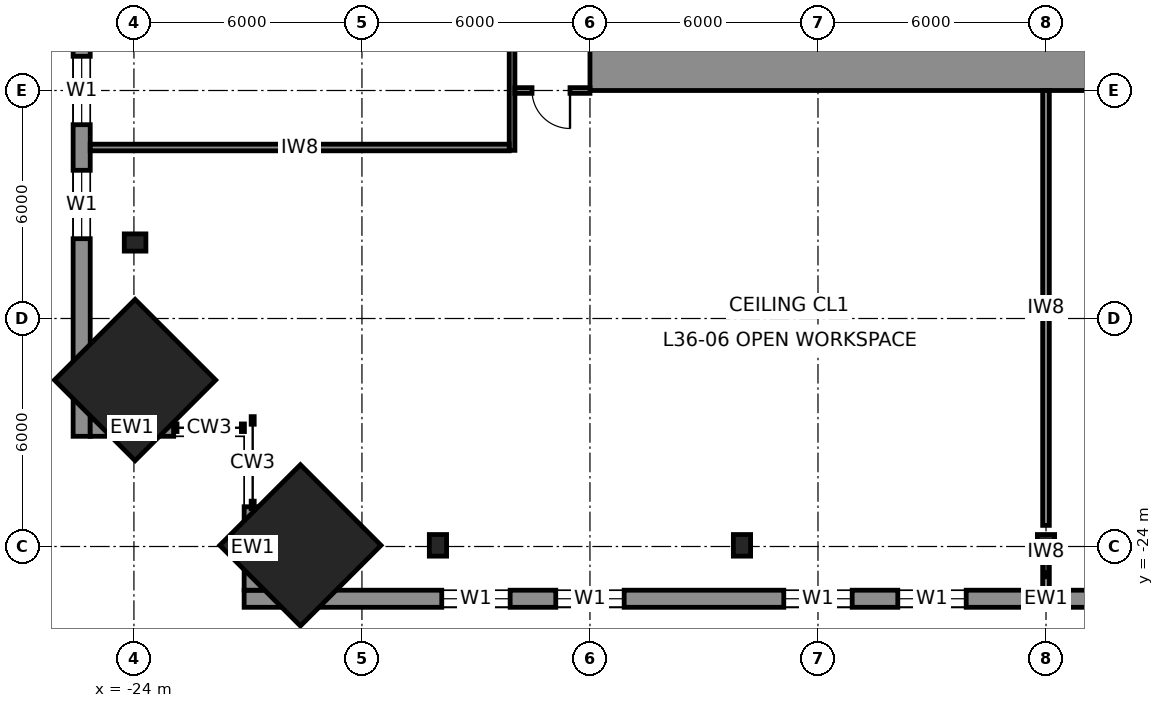
"""IFC4 building model, lengths in metres.
Left out: names, types, materials, properties, quantities, classifications, styles, units other than length and angle.
Written with IfcOpenShell. Run it as: python <this file> out.ifc"""

import sys

from ifc_helpers import new_model, si_unit, direction, frame, frame_2d, origin, origin_2d, place, context, subcontext, project, spatial, rectangle, i_section, extrude, element, fill, save


model = new_model("IFC4")
c1 = context("Model", 3, precision=1e-05, world=origin(), true_north=direction((0.0, 1.0)))
c2 = subcontext(c1, "Body", "Model", "MODEL_VIEW")
j1 = project(units=[si_unit("LENGTHUNIT", "METRE"), si_unit("PLANEANGLEUNIT", "RADIAN")], contexts=[c1])
p1 = place(None, origin())
s1 = spatial("IfcSite", under=j1, at=p1, CompositionType="ELEMENT")
p2 = place(p1, origin())
s2 = spatial("IfcBuilding", under=s1, at=p2, CompositionType="ELEMENT")
p3 = place(p2, frame((0.0, 0.0, 171.8)))
s3 = spatial("IfcBuildingStorey", under=s2, at=p3, CompositionType="ELEMENT", Elevation=171.8)
for number, where, z_axis, x_axis in (
    (1, (-19.619, -23.969, 0.0), (0.04, 0.04, 0.998), (-0.707, 0.708, 0.0)),
    (2, (-23.969, -19.619, 0.0), (0.04, 0.04, 0.998), (-0.708, 0.707, 0.0)),
):
    element("IfcColumn", number, at=place(p3, frame(where, z_axis=z_axis, x_axis=x_axis)), inside=s3, PredefinedType="COLUMN", context=c2, shape_type="SweptSolid", body=[
        extrude(rectangle(XDim=3.0, YDim=3.0, at=origin_2d()), origin(), (0.0, 0.0, 1.0), 4.007),
    ])
for number, where, z_axis, x_axis in (
    (3, (0.0, -23.969, 0.0), (0.0, 0.04, 0.999), (-1.0, 0.0, 0.0)),
    (4, (-8.0, -23.969, 0.0), (0.0, 0.04, 0.999), (-1.0, 0.0, 0.0)),
    (5, (-16.0, -23.969, 0.0), (0.0, 0.04, 0.999), (-1.0, 0.0, 0.0)),
    (6, (-23.969, -16.0, 0.0), (0.04, 0.0, 0.999), (0.0, 1.0, 0.0)),
):
    element("IfcColumn", number, at=place(p3, frame(where, z_axis=z_axis, x_axis=x_axis)), inside=s3, PredefinedType="COLUMN", context=c2, shape_type="SweptSolid", body=[
        extrude(i_section(OverallWidth=0.454, OverallDepth=0.569, WebThickness=0.078, FlangeThickness=0.125, at=origin_2d()), origin(), (0.0, 0.0, 1.0), 4.003),
    ])
p4 = place(p3, frame((12.0, -11.25, 0.0), z_axis=(0.0, 0.0, 1.0), x_axis=(-1.0, 0.0, 0.0)))
e7 = element("IfcWall", 7, at=p4, inside=s3, PredefinedType="SHEAR", context=c2, shape_type="SweptSolid", body=[
    extrude(rectangle(XDim=24.0, YDim=1.5, at=frame_2d((12.0, 0.0))), origin(), (0.0, 0.0, 1.0), 4.0),
])
p5 = place(p3, frame((-21.1, -25.375, 0.0), z_axis=(0.0, 0.0, 1.0), x_axis=(1.0, 0.0, 0.0)))
e8 = element("IfcWall", 8, at=p5, inside=s3, PredefinedType="SOLIDWALL", context=c2, shape_type="SweptSolid", body=[
    extrude(rectangle(XDim=42.2, YDim=0.45, at=frame_2d((21.1, 0.0))), origin(), (0.0, 0.0, 1.0), 3.83),
])
p6 = place(p5, frame((5.2, 0.0, 0.7)))
e9 = element("IfcOpeningElement", 9, at=p6, cuts=e8, PredefinedType="OPENING", context=c2, shape_type="SweptSolid", body=[
    extrude(rectangle(XDim=1.8, YDim=2.6, at=frame_2d((0.9, 1.3))), frame((0.0, 0.235, 0.0), z_axis=(0.0, -1.0, 0.0), x_axis=(1.0, 0.0, 0.0)), (0.0, 0.0, 1.0), 0.47),
])
p7 = place(p5, frame((8.2, 0.0, 0.7)))
e10 = element("IfcOpeningElement", 10, at=p7, cuts=e8, PredefinedType="OPENING", context=c2, shape_type="SweptSolid", body=[
    extrude(rectangle(XDim=1.8, YDim=2.6, at=frame_2d((0.9, 1.3))), frame((0.0, 0.235, 0.0), z_axis=(0.0, -1.0, 0.0), x_axis=(1.0, 0.0, 0.0)), (0.0, 0.0, 1.0), 0.47),
])
p8 = place(p5, frame((14.2, 0.0, 0.7)))
e11 = element("IfcOpeningElement", 11, at=p8, cuts=e8, PredefinedType="OPENING", context=c2, shape_type="SweptSolid", body=[
    extrude(rectangle(XDim=1.8, YDim=2.6, at=frame_2d((0.9, 1.3))), frame((0.0, 0.235, 0.0), z_axis=(0.0, -1.0, 0.0), x_axis=(1.0, 0.0, 0.0)), (0.0, 0.0, 1.0), 0.47),
])
p9 = place(p5, frame((17.2, 0.0, 0.7)))
e12 = element("IfcOpeningElement", 12, at=p9, cuts=e8, PredefinedType="OPENING", context=c2, shape_type="SweptSolid", body=[
    extrude(rectangle(XDim=1.8, YDim=2.6, at=frame_2d((0.9, 1.3))), frame((0.0, 0.235, 0.0), z_axis=(0.0, -1.0, 0.0), x_axis=(1.0, 0.0, 0.0)), (0.0, 0.0, 1.0), 0.47),
])
p10 = place(p5, frame((23.2, 0.0, 0.7)))
e13 = element("IfcOpeningElement", 13, at=p10, cuts=e8, PredefinedType="OPENING", context=c2, shape_type="SweptSolid", body=[
    extrude(rectangle(XDim=1.8, YDim=2.6, at=frame_2d((0.9, 1.3))), frame((0.0, 0.235, 0.0), z_axis=(0.0, -1.0, 0.0), x_axis=(1.0, 0.0, 0.0)), (0.0, 0.0, 1.0), 0.47),
])
p11 = place(p5, frame((26.2, 0.0, 0.7)))
e14 = element("IfcOpeningElement", 14, at=p11, cuts=e8, PredefinedType="OPENING", context=c2, shape_type="SweptSolid", body=[
    extrude(rectangle(XDim=1.8, YDim=2.6, at=frame_2d((0.9, 1.3))), frame((0.0, 0.235, 0.0), z_axis=(0.0, -1.0, 0.0), x_axis=(1.0, 0.0, 0.0)), (0.0, 0.0, 1.0), 0.47),
])
p12 = place(p5, frame((32.2, 0.0, 0.7)))
e15 = element("IfcOpeningElement", 15, at=p12, cuts=e8, PredefinedType="OPENING", context=c2, shape_type="SweptSolid", body=[
    extrude(rectangle(XDim=1.8, YDim=2.6, at=frame_2d((0.9, 1.3))), frame((0.0, 0.235, 0.0), z_axis=(0.0, -1.0, 0.0), x_axis=(1.0, 0.0, 0.0)), (0.0, 0.0, 1.0), 0.47),
])
p13 = place(p5, frame((35.2, 0.0, 0.7)))
e16 = element("IfcOpeningElement", 16, at=p13, cuts=e8, PredefinedType="OPENING", context=c2, shape_type="SweptSolid", body=[
    extrude(rectangle(XDim=1.8, YDim=2.6, at=frame_2d((0.9, 1.3))), frame((0.0, 0.235, 0.0), z_axis=(0.0, -1.0, 0.0), x_axis=(1.0, 0.0, 0.0)), (0.0, 0.0, 1.0), 0.47),
])
p14 = place(p3, frame((-25.375, 21.1, 0.0), z_axis=(0.0, 0.0, 1.0), x_axis=(0.0, -1.0, 0.0)))
e17 = element("IfcWall", 17, at=p14, inside=s3, PredefinedType="SOLIDWALL", context=c2, shape_type="SweptSolid", body=[
    extrude(rectangle(XDim=42.2, YDim=0.45, at=frame_2d((21.1, 0.0))), origin(), (0.0, 0.0, 1.0), 3.83),
])
p15 = place(p14, frame((5.2, 0.0, 0.7)))
e18 = element("IfcOpeningElement", 18, at=p15, cuts=e17, PredefinedType="OPENING", context=c2, shape_type="SweptSolid", body=[
    extrude(rectangle(XDim=1.8, YDim=2.6, at=frame_2d((0.9, 1.3))), frame((0.0, 0.235, 0.0), z_axis=(0.0, -1.0, 0.0), x_axis=(1.0, 0.0, 0.0)), (0.0, 0.0, 1.0), 0.47),
])
p16 = place(p14, frame((8.2, 0.0, 0.7)))
e19 = element("IfcOpeningElement", 19, at=p16, cuts=e17, PredefinedType="OPENING", context=c2, shape_type="SweptSolid", body=[
    extrude(rectangle(XDim=1.8, YDim=2.6, at=frame_2d((0.9, 1.3))), frame((0.0, 0.235, 0.0), z_axis=(0.0, -1.0, 0.0), x_axis=(1.0, 0.0, 0.0)), (0.0, 0.0, 1.0), 0.47),
])
p17 = place(p14, frame((14.2, 0.0, 0.7)))
e20 = element("IfcOpeningElement", 20, at=p17, cuts=e17, PredefinedType="OPENING", context=c2, shape_type="SweptSolid", body=[
    extrude(rectangle(XDim=1.8, YDim=2.6, at=frame_2d((0.9, 1.3))), frame((0.0, 0.235, 0.0), z_axis=(0.0, -1.0, 0.0), x_axis=(1.0, 0.0, 0.0)), (0.0, 0.0, 1.0), 0.47),
])
p18 = place(p14, frame((17.2, 0.0, 0.7)))
e21 = element("IfcOpeningElement", 21, at=p18, cuts=e17, PredefinedType="OPENING", context=c2, shape_type="SweptSolid", body=[
    extrude(rectangle(XDim=1.8, YDim=2.6, at=frame_2d((0.9, 1.3))), frame((0.0, 0.235, 0.0), z_axis=(0.0, -1.0, 0.0), x_axis=(1.0, 0.0, 0.0)), (0.0, 0.0, 1.0), 0.47),
])
p19 = place(p14, frame((23.2, 0.0, 0.7)))
e22 = element("IfcOpeningElement", 22, at=p19, cuts=e17, PredefinedType="OPENING", context=c2, shape_type="SweptSolid", body=[
    extrude(rectangle(XDim=1.8, YDim=2.6, at=frame_2d((0.9, 1.3))), frame((0.0, 0.235, 0.0), z_axis=(0.0, -1.0, 0.0), x_axis=(1.0, 0.0, 0.0)), (0.0, 0.0, 1.0), 0.47),
])
p20 = place(p14, frame((26.2, 0.0, 0.7)))
e23 = element("IfcOpeningElement", 23, at=p20, cuts=e17, PredefinedType="OPENING", context=c2, shape_type="SweptSolid", body=[
    extrude(rectangle(XDim=1.8, YDim=2.6, at=frame_2d((0.9, 1.3))), frame((0.0, 0.235, 0.0), z_axis=(0.0, -1.0, 0.0), x_axis=(1.0, 0.0, 0.0)), (0.0, 0.0, 1.0), 0.47),
])
p21 = place(p14, frame((32.2, 0.0, 0.7)))
e24 = element("IfcOpeningElement", 24, at=p21, cuts=e17, PredefinedType="OPENING", context=c2, shape_type="SweptSolid", body=[
    extrude(rectangle(XDim=1.8, YDim=2.6, at=frame_2d((0.9, 1.3))), frame((0.0, 0.235, 0.0), z_axis=(0.0, -1.0, 0.0), x_axis=(1.0, 0.0, 0.0)), (0.0, 0.0, 1.0), 0.47),
])
p22 = place(p14, frame((35.2, 0.0, 0.7)))
e25 = element("IfcOpeningElement", 25, at=p22, cuts=e17, PredefinedType="OPENING", context=c2, shape_type="SweptSolid", body=[
    extrude(rectangle(XDim=1.8, YDim=2.6, at=frame_2d((0.9, 1.3))), frame((0.0, 0.235, 0.0), z_axis=(0.0, -1.0, 0.0), x_axis=(1.0, 0.0, 0.0)), (0.0, 0.0, 1.0), 0.47),
])
for number, where, z_axis, x_axis in (
    (26, (-20.875, -22.954, 0.0), (0.0, 0.0, 1.0), (0.0, -1.0, 0.0)),
    (27, (-22.954, -20.875, 0.0), (0.0, 0.0, 1.0), (-1.0, 0.0, 0.0)),
):
    element("IfcWall", number, at=place(p3, frame(where, z_axis=z_axis, x_axis=x_axis)), inside=s3, PredefinedType="SOLIDWALL", context=c2, shape_type="SweptSolid", body=[
        extrude(rectangle(XDim=2.196, YDim=0.45, at=frame_2d((1.098, 0.0))), origin(), (0.0, 0.0, 1.0), 3.83),
    ])
p23 = place(p3, frame((-14.05, 13.975, 0.0), z_axis=(0.0, 0.0, 1.0), x_axis=(0.0, -1.0, 0.0)))
e28 = element("IfcWall", 28, at=p23, inside=s3, PredefinedType="PARTITIONING", context=c2, shape_type="SweptSolid", body=[
    extrude(rectangle(XDim=27.55, YDim=0.15, at=frame_2d((13.775, 0.0))), origin(), (0.0, 0.0, 1.0), 3.83),
])
p24 = place(p23, frame((22.025, 0.0, 0.0)))
e29 = element("IfcOpeningElement", 29, at=p24, cuts=e28, PredefinedType="OPENING", context=c2, shape_type="SweptSolid", body=[
    extrude(rectangle(XDim=1.6, YDim=2.3, at=frame_2d((0.8, 1.15))), frame((0.0, 0.085, 0.0), z_axis=(0.0, -1.0, 0.0), x_axis=(1.0, 0.0, 0.0)), (0.0, 0.0, 1.0), 0.17),
])
p25 = place(p23, frame((2.825, 0.0, 0.0)))
e30 = element("IfcOpeningElement", 30, at=p25, cuts=e28, PredefinedType="OPENING", context=c2, shape_type="SweptSolid", body=[
    extrude(rectangle(XDim=1.0, YDim=2.3, at=frame_2d((0.5, 1.15))), frame((0.0, 0.085, 0.0), z_axis=(0.0, -1.0, 0.0), x_axis=(1.0, 0.0, 0.0)), (0.0, 0.0, 1.0), 0.17),
])
p26 = place(p23, frame((17.975, 0.0, 0.0)))
e31 = element("IfcOpeningElement", 31, at=p26, cuts=e28, PredefinedType="OPENING", context=c2, shape_type="SweptSolid", body=[
    extrude(rectangle(XDim=1.0, YDim=2.3, at=frame_2d((0.5, 1.15))), frame((0.0, 0.085, 0.0), z_axis=(0.0, -1.0, 0.0), x_axis=(1.0, 0.0, 0.0)), (0.0, 0.0, 1.0), 0.17),
])
p27 = place(p23, frame((9.975, 0.0, 0.0)))
e32 = element("IfcOpeningElement", 32, at=p27, cuts=e28, PredefinedType="OPENING", context=c2, shape_type="SweptSolid", body=[
    extrude(rectangle(XDim=1.0, YDim=2.3, at=frame_2d((0.5, 1.15))), frame((0.0, 0.085, 0.0), z_axis=(0.0, -1.0, 0.0), x_axis=(1.0, 0.0, 0.0)), (0.0, 0.0, 1.0), 0.17),
])
p28 = place(p3, frame((-12.0, -12.0, 0.0), z_axis=(0.0, 0.0, 1.0), x_axis=(-1.0, 0.0, 0.0)))
e33 = element("IfcWall", 33, at=p28, inside=s3, PredefinedType="PARTITIONING", context=c2, shape_type="SweptSolid", body=[
    extrude(rectangle(XDim=1.975, YDim=0.15, at=frame_2d((0.988, 0.0))), origin(), (0.0, 0.0, 1.0), 3.83),
])
p29 = place(p28, frame((0.525, 0.0, 0.0)))
e34 = element("IfcOpeningElement", 34, at=p29, cuts=e33, PredefinedType="OPENING", context=c2, shape_type="SweptSolid", body=[
    extrude(rectangle(XDim=1.0, YDim=2.3, at=frame_2d((0.5, 1.15))), frame((0.0, 0.085, 0.0), z_axis=(0.0, -1.0, 0.0), x_axis=(1.0, 0.0, 0.0)), (0.0, 0.0, 1.0), 0.17),
])
p30 = place(p3, frame((-14.125, -13.5, 0.0), z_axis=(0.0, 0.0, 1.0), x_axis=(-1.0, 0.0, 0.0)))
e35 = element("IfcWall", 35, at=p30, inside=s3, PredefinedType="PARTITIONING", context=c2, shape_type="SweptSolid", body=[
    extrude(rectangle(XDim=11.025, YDim=0.175, at=frame_2d((5.512, 0.0))), origin(), (0.0, 0.0, 1.0), 3.83),
])
p31 = place(p3, frame((0.0, -12.0, 0.0), z_axis=(0.0, 0.0, 1.0), x_axis=(0.0, -1.0, 0.0)))
e36 = element("IfcWall", 36, at=p31, inside=s3, PredefinedType="PARTITIONING", context=c2, shape_type="SweptSolid", body=[
    extrude(rectangle(XDim=11.444, YDim=0.175, at=frame_2d((5.722, 0.0))), origin(), (0.0, 0.0, 1.0), 2.84),
])
p32 = place(p3, frame((0.0, -24.333, 0.0), z_axis=(0.0, 0.0, 1.0), x_axis=(0.0, -1.0, 0.0)))
e37 = element("IfcWall", 37, at=p32, inside=s3, PredefinedType="PARTITIONING", context=c2, shape_type="SweptSolid", body=[
    extrude(rectangle(XDim=0.817, YDim=0.175, at=frame_2d((0.408, 0.0))), origin(), (0.0, 0.0, 1.0), 3.83),
])
p33 = place(p6, origin())
e38 = element("IfcWindow", 38, at=p33, inside=s3, PartitioningType="SINGLE_PANEL", PredefinedType="WINDOW", context=c2, shape_type="SweptSolid", body=[
    extrude(rectangle(XDim=1.8, YDim=2.6, at=frame_2d((0.9, 1.3))), frame((0.0, 0.03, 0.0), z_axis=(0.0, -1.0, 0.0), x_axis=(1.0, 0.0, 0.0)), (0.0, 0.0, 1.0), 0.06),
])
fill(e9, e38)
p34 = place(p7, origin())
e39 = element("IfcWindow", 39, at=p34, inside=s3, PartitioningType="SINGLE_PANEL", PredefinedType="WINDOW", context=c2, shape_type="SweptSolid", body=[
    extrude(rectangle(XDim=1.8, YDim=2.6, at=frame_2d((0.9, 1.3))), frame((0.0, 0.03, 0.0), z_axis=(0.0, -1.0, 0.0), x_axis=(1.0, 0.0, 0.0)), (0.0, 0.0, 1.0), 0.06),
])
fill(e10, e39)
p35 = place(p8, origin())
e40 = element("IfcWindow", 40, at=p35, inside=s3, PartitioningType="SINGLE_PANEL", PredefinedType="WINDOW", context=c2, shape_type="SweptSolid", body=[
    extrude(rectangle(XDim=1.8, YDim=2.6, at=frame_2d((0.9, 1.3))), frame((0.0, 0.03, 0.0), z_axis=(0.0, -1.0, 0.0), x_axis=(1.0, 0.0, 0.0)), (0.0, 0.0, 1.0), 0.06),
])
fill(e11, e40)
p36 = place(p9, origin())
e41 = element("IfcWindow", 41, at=p36, inside=s3, PartitioningType="SINGLE_PANEL", PredefinedType="WINDOW", context=c2, shape_type="SweptSolid", body=[
    extrude(rectangle(XDim=1.8, YDim=2.6, at=frame_2d((0.9, 1.3))), frame((0.0, 0.03, 0.0), z_axis=(0.0, -1.0, 0.0), x_axis=(1.0, 0.0, 0.0)), (0.0, 0.0, 1.0), 0.06),
])
fill(e12, e41)
p37 = place(p21, origin())
e42 = element("IfcWindow", 42, at=p37, inside=s3, PartitioningType="SINGLE_PANEL", PredefinedType="WINDOW", context=c2, shape_type="SweptSolid", body=[
    extrude(rectangle(XDim=1.8, YDim=2.6, at=frame_2d((0.9, 1.3))), frame((0.0, 0.03, 0.0), z_axis=(0.0, -1.0, 0.0), x_axis=(1.0, 0.0, 0.0)), (0.0, 0.0, 1.0), 0.06),
])
fill(e24, e42)
p38 = place(p22, origin())
e43 = element("IfcWindow", 43, at=p38, inside=s3, PartitioningType="SINGLE_PANEL", PredefinedType="WINDOW", context=c2, shape_type="SweptSolid", body=[
    extrude(rectangle(XDim=1.8, YDim=2.6, at=frame_2d((0.9, 1.3))), frame((0.0, 0.03, 0.0), z_axis=(0.0, -1.0, 0.0), x_axis=(1.0, 0.0, 0.0)), (0.0, 0.0, 1.0), 0.06),
])
fill(e25, e43)
p39 = place(p29, origin())
e44 = element("IfcDoor", 44, at=p39, inside=s3, OperationType="SINGLE_SWING_LEFT", PredefinedType="DOOR", context=c2, shape_type="SweptSolid", body=[
    extrude(rectangle(XDim=1.0, YDim=2.3, at=frame_2d((0.5, 1.15))), frame((0.0, 0.025, 0.0), z_axis=(0.0, -1.0, 0.0), x_axis=(1.0, 0.0, 0.0)), (0.0, 0.0, 1.0), 0.05),
])
fill(e34, e44)
save(model, sys.argv[1])
